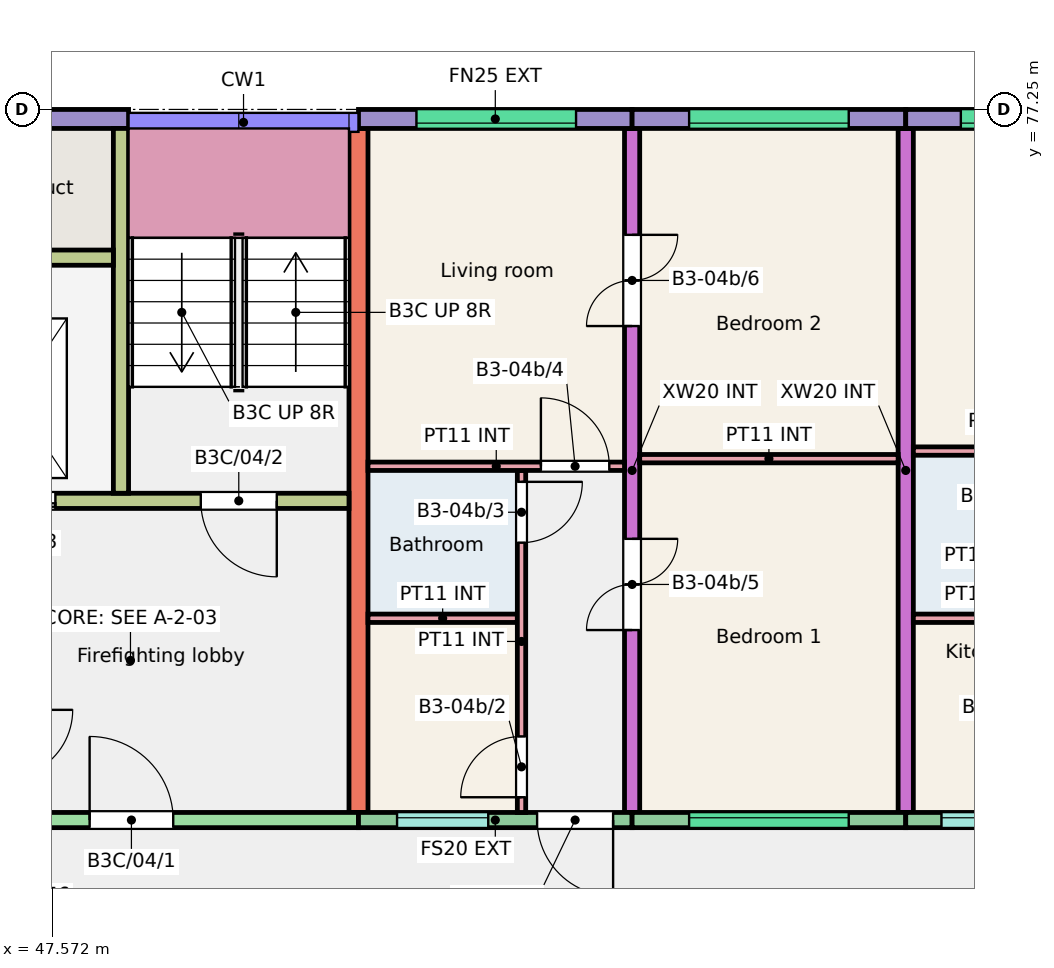
"""IFC4 building model, lengths in metres.
Left out: names, types, materials, properties, quantities, classifications, styles, units other than length and angle.
Written with IfcOpenShell. Run it as: python <this file> out.ifc"""

import sys

from ifc_helpers import new_model, si_unit, direction, frame, frame_2d, origin, place, context, subcontext, project, spatial, rectangle, extrude, element, fill, save


model = new_model("IFC4")
c1 = context("Model", 3, precision=1e-05, world=origin(), true_north=direction((0.0, 1.0)))
c2 = subcontext(c1, "Body", "Model", "MODEL_VIEW")
j1 = project(units=[si_unit("LENGTHUNIT", "METRE"), si_unit("PLANEANGLEUNIT", "RADIAN")], contexts=[c1])
p1 = place(None, origin())
s1 = spatial("IfcSite", under=j1, at=p1, CompositionType="ELEMENT")
p2 = place(p1, origin())
s2 = spatial("IfcBuilding", under=s1, at=p2, CompositionType="ELEMENT")
p3 = place(p2, frame((0.0, 0.0, 12.0)))
s3 = spatial("IfcBuildingStorey", under=s2, at=p3, CompositionType="ELEMENT", Elevation=12.0)
p4 = place(p3, frame((51.6, 68.0, 0.0), z_axis=(0.0, 0.0, 1.0), x_axis=(0.0, 1.0, 0.0)))
e1 = element("IfcWall", 1, at=p4, inside=s3, PredefinedType="SHEAR", context=c2, shape_type="SweptSolid", body=[
    extrude(rectangle(XDim=9.0, YDim=0.25, at=frame_2d((4.5, 0.0))), origin(), (0.0, 0.0, 1.0), 3.0),
])
p5 = place(p3, frame((55.2, 68.0, 0.0), z_axis=(0.0, 0.0, 1.0), x_axis=(0.0, 1.0, 0.0)))
e2 = element("IfcWall", 2, at=p5, inside=s3, PredefinedType="SHEAR", context=c2, shape_type="SweptSolid", body=[
    extrude(rectangle(XDim=9.0, YDim=0.2, at=frame_2d((4.5, 0.0))), origin(), (0.0, 0.0, 1.0), 3.0),
])
p6 = place(p5, frame((2.4, 0.0, 0.0)))
e3 = element("IfcOpeningElement", 3, at=p6, cuts=e2, PredefinedType="OPENING", context=c2, shape_type="SweptSolid", body=[
    extrude(rectangle(XDim=1.2, YDim=2.1, at=frame_2d((0.6, 1.05))), frame((0.0, 0.11, 0.0), z_axis=(0.0, -1.0, 0.0), x_axis=(1.0, 0.0, 0.0)), (0.0, 0.0, 1.0), 0.22),
])
p7 = place(p5, frame((6.4, 0.0, 0.0)))
e4 = element("IfcOpeningElement", 4, at=p7, cuts=e2, PredefinedType="OPENING", context=c2, shape_type="SweptSolid", body=[
    extrude(rectangle(XDim=1.2, YDim=2.1, at=frame_2d((0.6, 1.05))), frame((0.0, 0.11, 0.0), z_axis=(0.0, -1.0, 0.0), x_axis=(1.0, 0.0, 0.0)), (0.0, 0.0, 1.0), 0.22),
])
p8 = place(p3, frame((58.8, 68.0, 0.0), z_axis=(0.0, 0.0, 1.0), x_axis=(0.0, 1.0, 0.0)))
e5 = element("IfcWall", 5, at=p8, inside=s3, PredefinedType="SHEAR", context=c2, shape_type="SweptSolid", body=[
    extrude(rectangle(XDim=9.0, YDim=0.2, at=frame_2d((4.5, 0.0))), origin(), (0.0, 0.0, 1.0), 3.0),
])
p9 = place(p3, frame((45.6, 77.125, 0.0), z_axis=(0.0, 0.0, 1.0), x_axis=(1.0, 0.0, 0.0)))
e6 = element("IfcWall", 6, at=p9, inside=s3, PredefinedType="SOLIDWALL", context=c2, shape_type="SweptSolid", body=[
    extrude(rectangle(XDim=2.975, YDim=0.25, at=frame_2d((1.487, 0.0))), origin(), (0.0, 0.0, 1.0), 3.0),
])
p10 = place(p3, frame((45.75, 67.9, 0.0), z_axis=(0.0, 0.0, 1.0), x_axis=(1.0, 0.0, 0.0)))
e7 = element("IfcWall", 7, at=p10, inside=s3, PredefinedType="SHEAR", context=c2, shape_type="SweptSolid", body=[
    extrude(rectangle(XDim=5.85, YDim=0.2, at=frame_2d((2.925, 0.0))), origin(), (0.0, 0.0, 1.0), 3.0),
])
p11 = place(p10, frame((2.312, 0.0, 0.0)))
e8 = element("IfcOpeningElement", 8, at=p11, cuts=e7, PredefinedType="OPENING", context=c2, shape_type="SweptSolid", body=[
    extrude(rectangle(XDim=1.1, YDim=2.1, at=frame_2d((0.55, 1.05))), frame((0.0, 0.11, 0.0), z_axis=(0.0, -1.0, 0.0), x_axis=(1.0, 0.0, 0.0)), (0.0, 0.0, 1.0), 0.22),
])
p12 = place(p3, frame((45.75, 72.1, 0.0), z_axis=(0.0, 0.0, 1.0), x_axis=(1.0, 0.0, 0.0)))
e9 = element("IfcWall", 9, at=p12, inside=s3, PredefinedType="SHEAR", context=c2, shape_type="SweptSolid", body=[
    extrude(rectangle(XDim=5.725, YDim=0.2, at=frame_2d((2.863, 0.0))), origin(), (0.0, 0.0, 1.0), 3.0),
])
p13 = place(p12, frame((3.775, 0.0, 0.0)))
e10 = element("IfcOpeningElement", 10, at=p13, cuts=e9, PredefinedType="OPENING", context=c2, shape_type="SweptSolid", body=[
    extrude(rectangle(XDim=1.0, YDim=2.1, at=frame_2d((0.5, 1.05))), frame((0.0, 0.11, 0.0), z_axis=(0.0, -1.0, 0.0), x_axis=(1.0, 0.0, 0.0)), (0.0, 0.0, 1.0), 0.22),
])
p14 = place(p12, frame((0.762, 0.0, 0.0)))
e11 = element("IfcOpeningElement", 11, at=p14, cuts=e9, PredefinedType="OPENING", context=c2, shape_type="SweptSolid", body=[
    extrude(rectangle(XDim=1.1, YDim=2.1, at=frame_2d((0.55, 1.05))), frame((0.0, 0.11, 0.0), z_axis=(0.0, -1.0, 0.0), x_axis=(1.0, 0.0, 0.0)), (0.0, 0.0, 1.0), 0.22),
])
p15 = place(p3, frame((48.475, 72.2, 0.0), z_axis=(0.0, 0.0, 1.0), x_axis=(0.0, 1.0, 0.0)))
e12 = element("IfcWall", 12, at=p15, inside=s3, PredefinedType="SHEAR", context=c2, shape_type="SweptSolid", body=[
    extrude(rectangle(XDim=4.8, YDim=0.2, at=frame_2d((2.4, 0.0))), origin(), (0.0, 0.0, 1.0), 3.0),
])
p16 = place(p3, frame((45.75, 75.3, 0.0), z_axis=(0.0, 0.0, 1.0), x_axis=(1.0, 0.0, 0.0)))
e13 = element("IfcWall", 13, at=p16, inside=s3, PredefinedType="SHEAR", context=c2, shape_type="SweptSolid", body=[
    extrude(rectangle(XDim=2.625, YDim=0.2, at=frame_2d((1.312, 0.0))), origin(), (0.0, 0.0, 1.0), 3.0),
])
p17 = place(p3, frame((51.6, 77.125, 0.0), z_axis=(0.0, 0.0, 1.0), x_axis=(1.0, 0.0, 0.0)))
e14 = element("IfcWall", 14, at=p17, inside=s3, PredefinedType="SOLIDWALL", context=c2, shape_type="SweptSolid", body=[
    extrude(rectangle(XDim=3.6, YDim=0.25, at=frame_2d((1.8, 0.0))), origin(), (0.0, 0.0, 1.0), 3.0),
])
p18 = place(p17, frame((0.762, 0.0, 1.2)))
e15 = element("IfcOpeningElement", 15, at=p18, cuts=e14, PredefinedType="OPENING", context=c2, shape_type="SweptSolid", body=[
    extrude(rectangle(XDim=2.1, YDim=1.2, at=frame_2d((1.05, 0.6))), frame((0.0, 0.135, 0.0), z_axis=(0.0, -1.0, 0.0), x_axis=(1.0, 0.0, 0.0)), (0.0, 0.0, 1.0), 0.27),
])
p19 = place(p3, frame((51.6, 67.9, 0.0), z_axis=(0.0, 0.0, 1.0), x_axis=(1.0, 0.0, 0.0)))
e16 = element("IfcWall", 16, at=p19, inside=s3, PredefinedType="SOLIDWALL", context=c2, shape_type="SweptSolid", body=[
    extrude(rectangle(XDim=3.6, YDim=0.2, at=frame_2d((1.8, 0.0))), origin(), (0.0, 0.0, 1.0), 3.0),
])
p20 = place(p19, frame((0.508, 0.0, 1.1)))
e17 = element("IfcOpeningElement", 17, at=p20, cuts=e16, PredefinedType="OPENING", context=c2, shape_type="SweptSolid", body=[
    extrude(rectangle(XDim=1.2, YDim=1.3, at=frame_2d((0.6, 0.65))), frame((0.0, 0.11, 0.0), z_axis=(0.0, -1.0, 0.0), x_axis=(1.0, 0.0, 0.0)), (0.0, 0.0, 1.0), 0.22),
])
p21 = place(p19, frame((2.35, 0.0, 0.0)))
e18 = element("IfcOpeningElement", 18, at=p21, cuts=e16, PredefinedType="OPENING", context=c2, shape_type="SweptSolid", body=[
    extrude(rectangle(XDim=1.0, YDim=2.1, at=frame_2d((0.5, 1.05))), frame((0.0, 0.11, 0.0), z_axis=(0.0, -1.0, 0.0), x_axis=(1.0, 0.0, 0.0)), (0.0, 0.0, 1.0), 0.22),
])
p22 = place(p3, frame((55.2, 77.125, 0.0), z_axis=(0.0, 0.0, 1.0), x_axis=(1.0, 0.0, 0.0)))
e19 = element("IfcWall", 19, at=p22, inside=s3, PredefinedType="SOLIDWALL", context=c2, shape_type="SweptSolid", body=[
    extrude(rectangle(XDim=3.6, YDim=0.25, at=frame_2d((1.8, 0.0))), origin(), (0.0, 0.0, 1.0), 3.0),
])
p23 = place(p22, frame((0.75, 0.0, 1.2)))
e20 = element("IfcOpeningElement", 20, at=p23, cuts=e19, PredefinedType="OPENING", context=c2, shape_type="SweptSolid", body=[
    extrude(rectangle(XDim=2.1, YDim=1.2, at=frame_2d((1.05, 0.6))), frame((0.0, 0.135, 0.0), z_axis=(0.0, -1.0, 0.0), x_axis=(1.0, 0.0, 0.0)), (0.0, 0.0, 1.0), 0.27),
])
p24 = place(p3, frame((55.2, 67.9, 0.0), z_axis=(0.0, 0.0, 1.0), x_axis=(1.0, 0.0, 0.0)))
e21 = element("IfcWall", 21, at=p24, inside=s3, PredefinedType="SOLIDWALL", context=c2, shape_type="SweptSolid", body=[
    extrude(rectangle(XDim=3.6, YDim=0.2, at=frame_2d((1.8, 0.0))), origin(), (0.0, 0.0, 1.0), 3.0),
])
p25 = place(p24, frame((0.75, 0.0, 1.2)))
e22 = element("IfcOpeningElement", 22, at=p25, cuts=e21, PredefinedType="OPENING", context=c2, shape_type="SweptSolid", body=[
    extrude(rectangle(XDim=2.1, YDim=1.2, at=frame_2d((1.05, 0.6))), frame((0.0, 0.11, 0.0), z_axis=(0.0, -1.0, 0.0), x_axis=(1.0, 0.0, 0.0)), (0.0, 0.0, 1.0), 0.22),
])
p26 = place(p3, frame((58.8, 77.125, 0.0), z_axis=(0.0, 0.0, 1.0), x_axis=(1.0, 0.0, 0.0)))
e23 = element("IfcWall", 23, at=p26, inside=s3, PredefinedType="SOLIDWALL", context=c2, shape_type="SweptSolid", body=[
    extrude(rectangle(XDim=3.6, YDim=0.25, at=frame_2d((1.8, 0.0))), origin(), (0.0, 0.0, 1.0), 3.0),
])
p27 = place(p26, frame((0.725, 0.0, 1.2)))
e24 = element("IfcOpeningElement", 24, at=p27, cuts=e23, PredefinedType="OPENING", context=c2, shape_type="SweptSolid", body=[
    extrude(rectangle(XDim=2.1, YDim=1.2, at=frame_2d((1.05, 0.6))), frame((0.0, 0.135, 0.0), z_axis=(0.0, -1.0, 0.0), x_axis=(1.0, 0.0, 0.0)), (0.0, 0.0, 1.0), 0.27),
])
p28 = place(p3, frame((58.8, 67.9, 0.0), z_axis=(0.0, 0.0, 1.0), x_axis=(1.0, 0.0, 0.0)))
e25 = element("IfcWall", 25, at=p28, inside=s3, PredefinedType="SOLIDWALL", context=c2, shape_type="SweptSolid", body=[
    extrude(rectangle(XDim=3.45, YDim=0.2, at=frame_2d((1.725, 0.0))), origin(), (0.0, 0.0, 1.0), 3.0),
])
p29 = place(p28, frame((0.47, 0.0, 1.1)))
e26 = element("IfcOpeningElement", 26, at=p29, cuts=e25, PredefinedType="OPENING", context=c2, shape_type="SweptSolid", body=[
    extrude(rectangle(XDim=1.2, YDim=1.3, at=frame_2d((0.6, 0.65))), frame((0.0, 0.11, 0.0), z_axis=(0.0, -1.0, 0.0), x_axis=(1.0, 0.0, 0.0)), (0.0, 0.0, 1.0), 0.22),
])
p30 = place(p28, frame((2.3, 0.0, 0.0)))
e27 = element("IfcOpeningElement", 27, at=p30, cuts=e25, PredefinedType="OPENING", context=c2, shape_type="SweptSolid", body=[
    extrude(rectangle(XDim=1.0, YDim=2.1, at=frame_2d((0.5, 1.05))), frame((0.0, 0.11, 0.0), z_axis=(0.0, -1.0, 0.0), x_axis=(1.0, 0.0, 0.0)), (0.0, 0.0, 1.0), 0.22),
])
p31 = place(p3, frame((58.9, 70.555, 0.0), z_axis=(0.0, 0.0, 1.0), x_axis=(1.0, 0.0, 0.0)))
e28 = element("IfcWall", 28, at=p31, inside=s3, PredefinedType="PARTITIONING", context=c2, shape_type="SweptSolid", body=[
    extrude(rectangle(XDim=1.94, YDim=0.11, at=frame_2d((0.97, 0.0))), origin(), (0.0, 0.0, 1.0), 2.8),
])
p32 = place(p3, frame((58.9, 72.755, 0.0), z_axis=(0.0, 0.0, 1.0), x_axis=(1.0, 0.0, 0.0)))
e29 = element("IfcWall", 29, at=p32, inside=s3, PredefinedType="PARTITIONING", context=c2, shape_type="SweptSolid", body=[
    extrude(rectangle(XDim=3.35, YDim=0.11, at=frame_2d((1.675, 0.0))), origin(), (0.0, 0.0, 1.0), 2.8),
])
p33 = place(p32, frame((2.25, 0.0, 0.0)))
e30 = element("IfcOpeningElement", 30, at=p33, cuts=e29, PredefinedType="OPENING", context=c2, shape_type="SweptSolid", body=[
    extrude(rectangle(XDim=0.9, YDim=2.1, at=frame_2d((0.45, 1.05))), frame((0.0, 0.065, 0.0), z_axis=(0.0, -1.0, 0.0), x_axis=(1.0, 0.0, 0.0)), (0.0, 0.0, 1.0), 0.13),
])
p34 = place(p3, frame((51.725, 70.555, 0.0), z_axis=(0.0, 0.0, 1.0), x_axis=(1.0, 0.0, 0.0)))
e31 = element("IfcWall", 31, at=p34, inside=s3, PredefinedType="PARTITIONING", context=c2, shape_type="SweptSolid", body=[
    extrude(rectangle(XDim=1.965, YDim=0.11, at=frame_2d((0.982, 0.0))), origin(), (0.0, 0.0, 1.0), 2.8),
])
p35 = place(p3, frame((53.745, 68.0, 0.0), z_axis=(0.0, 0.0, 1.0), x_axis=(0.0, 1.0, 0.0)))
e32 = element("IfcWall", 32, at=p35, inside=s3, PredefinedType="PARTITIONING", context=c2, shape_type="SweptSolid", body=[
    extrude(rectangle(XDim=4.5, YDim=0.11, at=frame_2d((2.25, 0.0))), origin(), (0.0, 0.0, 1.0), 2.8),
])
p36 = place(p35, frame((0.2, 0.0, 0.0)))
e33 = element("IfcOpeningElement", 33, at=p36, cuts=e32, PredefinedType="OPENING", context=c2, shape_type="SweptSolid", body=[
    extrude(rectangle(XDim=0.8, YDim=2.1, at=frame_2d((0.4, 1.05))), frame((0.0, 0.065, 0.0), z_axis=(0.0, -1.0, 0.0), x_axis=(1.0, 0.0, 0.0)), (0.0, 0.0, 1.0), 0.13),
])
p37 = place(p35, frame((3.55, 0.0, 0.0)))
e34 = element("IfcOpeningElement", 34, at=p37, cuts=e32, PredefinedType="OPENING", context=c2, shape_type="SweptSolid", body=[
    extrude(rectangle(XDim=0.8, YDim=2.1, at=frame_2d((0.4, 1.05))), frame((0.0, 0.065, 0.0), z_axis=(0.0, -1.0, 0.0), x_axis=(1.0, 0.0, 0.0)), (0.0, 0.0, 1.0), 0.13),
])
p38 = place(p3, frame((51.725, 72.555, 0.0), z_axis=(0.0, 0.0, 1.0), x_axis=(1.0, 0.0, 0.0)))
e35 = element("IfcWall", 35, at=p38, inside=s3, PredefinedType="PARTITIONING", context=c2, shape_type="SweptSolid", body=[
    extrude(rectangle(XDim=3.375, YDim=0.11, at=frame_2d((1.688, 0.0))), origin(), (0.0, 0.0, 1.0), 2.8),
])
p39 = place(p38, frame((2.275, 0.0, 0.0)))
e36 = element("IfcOpeningElement", 36, at=p39, cuts=e35, PredefinedType="OPENING", context=c2, shape_type="SweptSolid", body=[
    extrude(rectangle(XDim=0.9, YDim=2.1, at=frame_2d((0.45, 1.05))), frame((0.0, 0.065, 0.0), z_axis=(0.0, -1.0, 0.0), x_axis=(1.0, 0.0, 0.0)), (0.0, 0.0, 1.0), 0.13),
])
p40 = place(p3, frame((55.3, 72.655, 0.0), z_axis=(0.0, 0.0, 1.0), x_axis=(1.0, 0.0, 0.0)))
e37 = element("IfcWall", 37, at=p40, inside=s3, PredefinedType="PARTITIONING", context=c2, shape_type="SweptSolid", body=[
    extrude(rectangle(XDim=3.4, YDim=0.11, at=frame_2d((1.7, 0.0))), origin(), (0.0, 0.0, 1.0), 2.8),
])
p41 = place(p29, origin())
e38 = element("IfcWindow", 38, at=p41, inside=s3, PartitioningType="SINGLE_PANEL", PredefinedType="WINDOW", context=c2, shape_type="SweptSolid", body=[
    extrude(rectangle(XDim=1.2, YDim=1.3, at=frame_2d((0.6, 0.65))), frame((0.0, 0.06, 0.0), z_axis=(0.0, -1.0, 0.0), x_axis=(1.0, 0.0, 0.0)), (0.0, 0.0, 1.0), 0.06),
])
fill(e26, e38)
p42 = place(p27, origin())
e39 = element("IfcWindow", 39, at=p42, inside=s3, PartitioningType="SINGLE_PANEL", PredefinedType="WINDOW", context=c2, shape_type="SweptSolid", body=[
    extrude(rectangle(XDim=2.1, YDim=1.2, at=frame_2d((1.05, 0.6))), frame((0.0, -0.025, 0.0), z_axis=(0.0, -1.0, 0.0), x_axis=(1.0, 0.0, 0.0)), (0.0, 0.0, 1.0), 0.06),
])
fill(e24, e39)
p43 = place(p25, origin())
e40 = element("IfcWindow", 40, at=p43, inside=s3, PartitioningType="SINGLE_PANEL", PredefinedType="WINDOW", context=c2, shape_type="SweptSolid", body=[
    extrude(rectangle(XDim=2.1, YDim=1.2, at=frame_2d((1.05, 0.6))), frame((0.0, 0.06, 0.0), z_axis=(0.0, -1.0, 0.0), x_axis=(1.0, 0.0, 0.0)), (0.0, 0.0, 1.0), 0.06),
])
fill(e22, e40)
p44 = place(p23, origin())
e41 = element("IfcWindow", 41, at=p44, inside=s3, PartitioningType="SINGLE_PANEL", PredefinedType="WINDOW", context=c2, shape_type="SweptSolid", body=[
    extrude(rectangle(XDim=2.1, YDim=1.2, at=frame_2d((1.05, 0.6))), frame((0.0, -0.025, 0.0), z_axis=(0.0, -1.0, 0.0), x_axis=(1.0, 0.0, 0.0)), (0.0, 0.0, 1.0), 0.06),
])
fill(e20, e41)
p45 = place(p20, origin())
e42 = element("IfcWindow", 42, at=p45, inside=s3, PartitioningType="SINGLE_PANEL", PredefinedType="WINDOW", context=c2, shape_type="SweptSolid", body=[
    extrude(rectangle(XDim=1.2, YDim=1.3, at=frame_2d((0.6, 0.65))), frame((0.0, 0.06, 0.0), z_axis=(0.0, -1.0, 0.0), x_axis=(1.0, 0.0, 0.0)), (0.0, 0.0, 1.0), 0.06),
])
fill(e17, e42)
p46 = place(p18, origin())
e43 = element("IfcWindow", 43, at=p46, inside=s3, PartitioningType="SINGLE_PANEL", PredefinedType="WINDOW", context=c2, shape_type="SweptSolid", body=[
    extrude(rectangle(XDim=2.1, YDim=1.2, at=frame_2d((1.05, 0.6))), frame((0.0, -0.025, 0.0), z_axis=(0.0, -1.0, 0.0), x_axis=(1.0, 0.0, 0.0)), (0.0, 0.0, 1.0), 0.06),
])
fill(e15, e43)
p47 = place(p21, origin())
e44 = element("IfcDoor", 44, at=p47, inside=s3, OperationType="SINGLE_SWING_RIGHT", PredefinedType="DOOR", context=c2, shape_type="SweptSolid", body=[
    extrude(rectangle(XDim=1.0, YDim=2.1, at=frame_2d((0.5, 1.05))), frame((0.0, 0.025, 0.0), z_axis=(0.0, -1.0, 0.0), x_axis=(1.0, 0.0, 0.0)), (0.0, 0.0, 1.0), 0.05),
])
fill(e18, e44)
p48 = place(p36, origin())
e45 = element("IfcDoor", 45, at=p48, inside=s3, OperationType="SINGLE_SWING_LEFT", PredefinedType="DOOR", context=c2, shape_type="SweptSolid", body=[
    extrude(rectangle(XDim=0.8, YDim=2.1, at=frame_2d((0.4, 1.05))), frame((0.0, 0.025, 0.0), z_axis=(0.0, -1.0, 0.0), x_axis=(1.0, 0.0, 0.0)), (0.0, 0.0, 1.0), 0.05),
])
fill(e33, e45)
p49 = place(p37, origin())
e46 = element("IfcDoor", 46, at=p49, inside=s3, OperationType="SINGLE_SWING_RIGHT", PredefinedType="DOOR", context=c2, shape_type="SweptSolid", body=[
    extrude(rectangle(XDim=0.8, YDim=2.1, at=frame_2d((0.4, 1.05))), frame((0.0, 0.025, 0.0), z_axis=(0.0, -1.0, 0.0), x_axis=(1.0, 0.0, 0.0)), (0.0, 0.0, 1.0), 0.05),
])
fill(e34, e46)
p50 = place(p39, origin())
e47 = element("IfcDoor", 47, at=p50, inside=s3, OperationType="SINGLE_SWING_LEFT", PredefinedType="DOOR", context=c2, shape_type="SweptSolid", body=[
    extrude(rectangle(XDim=0.9, YDim=2.1, at=frame_2d((0.45, 1.05))), frame((0.0, 0.025, 0.0), z_axis=(0.0, -1.0, 0.0), x_axis=(1.0, 0.0, 0.0)), (0.0, 0.0, 1.0), 0.05),
])
fill(e36, e47)
p51 = place(p6, origin())
e48 = element("IfcDoor", 48, at=p51, inside=s3, OperationType="DOUBLE_DOOR_SINGLE_SWING", PredefinedType="DOOR", context=c2, shape_type="SweptSolid", body=[
    extrude(rectangle(XDim=1.2, YDim=2.1, at=frame_2d((0.6, 1.05))), frame((0.0, 0.025, 0.0), z_axis=(0.0, -1.0, 0.0), x_axis=(1.0, 0.0, 0.0)), (0.0, 0.0, 1.0), 0.05),
])
fill(e3, e48)
p52 = place(p7, origin())
e49 = element("IfcDoor", 49, at=p52, inside=s3, OperationType="DOUBLE_DOOR_SINGLE_SWING", PredefinedType="DOOR", context=c2, shape_type="SweptSolid", body=[
    extrude(rectangle(XDim=1.2, YDim=2.1, at=frame_2d((0.6, 1.05))), frame((0.0, 0.025, 0.0), z_axis=(0.0, -1.0, 0.0), x_axis=(1.0, 0.0, 0.0)), (0.0, 0.0, 1.0), 0.05),
])
fill(e4, e49)
p53 = place(p11, origin())
e50 = element("IfcDoor", 50, at=p53, inside=s3, OperationType="SINGLE_SWING_LEFT", PredefinedType="DOOR", context=c2, shape_type="SweptSolid", body=[
    extrude(rectangle(XDim=1.1, YDim=2.1, at=frame_2d((0.55, 1.05))), frame((0.0, 0.025, 0.0), z_axis=(0.0, -1.0, 0.0), x_axis=(1.0, 0.0, 0.0)), (0.0, 0.0, 1.0), 0.05),
])
fill(e8, e50)
p54 = place(p13, origin())
e51 = element("IfcDoor", 51, at=p54, inside=s3, OperationType="SINGLE_SWING_RIGHT", PredefinedType="DOOR", context=c2, shape_type="SweptSolid", body=[
    extrude(rectangle(XDim=1.0, YDim=2.1, at=frame_2d((0.5, 1.05))), frame((0.0, 0.025, 0.0), z_axis=(0.0, -1.0, 0.0), x_axis=(1.0, 0.0, 0.0)), (0.0, 0.0, 1.0), 0.05),
])
fill(e10, e51)
p55 = place(p14, origin())
e52 = element("IfcDoor", 52, at=p55, inside=s3, OperationType="DOUBLE_DOOR_SLIDING", PredefinedType="DOOR", context=c2, shape_type="SweptSolid", body=[
    extrude(rectangle(XDim=1.1, YDim=2.1, at=frame_2d((0.55, 1.05))), frame((0.0, 0.025, 0.0), z_axis=(0.0, -1.0, 0.0), x_axis=(1.0, 0.0, 0.0)), (0.0, 0.0, 1.0), 0.05),
])
fill(e11, e52)
save(model, sys.argv[1])
